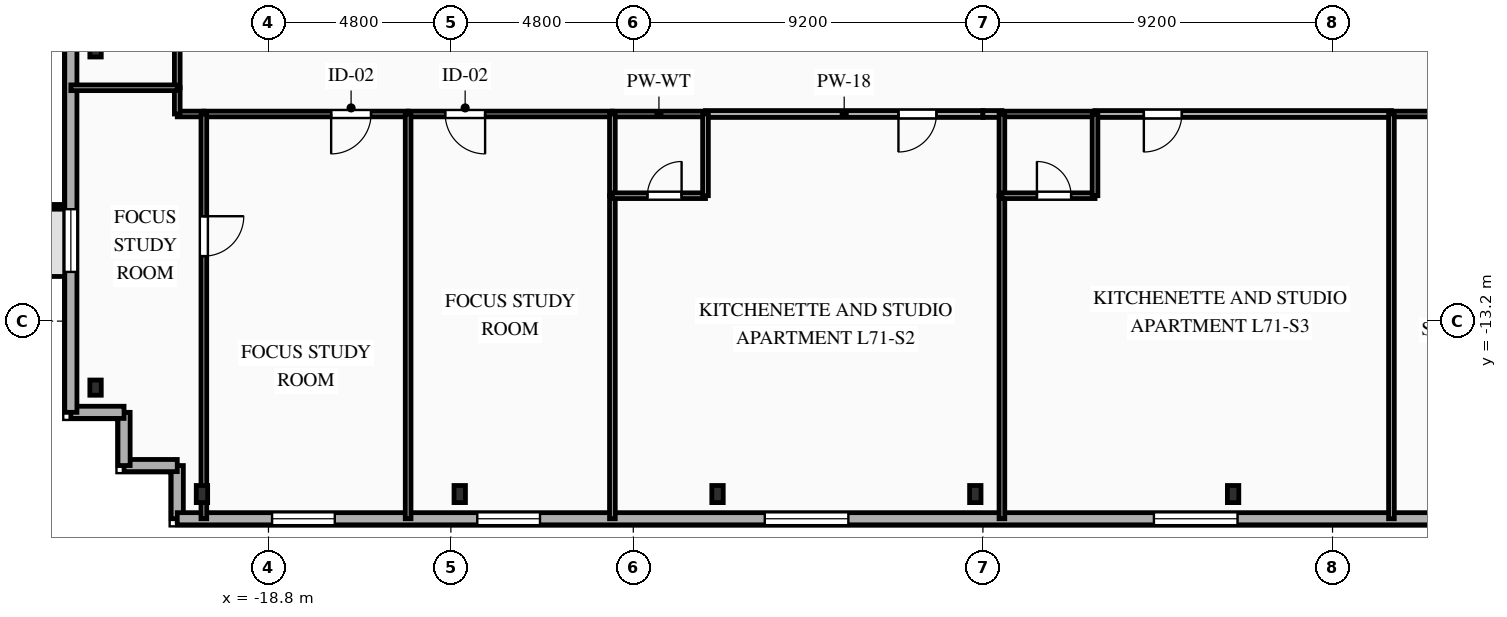
"""IFC4 building model, lengths in metres.
Left out: names, types, materials, properties, quantities, classifications, styles, units other than length and angle.
Written with IfcOpenShell. Run it as: python <this file> out.ifc"""

import sys

from ifc_helpers import new_model, si_unit, direction, frame, frame_2d, origin, origin_2d, place, context, subcontext, project, spatial, rectangle, i_section, extrude, element, fill, save


model = new_model("IFC4")
c1 = context("Model", 3, precision=1e-05, world=origin(), true_north=direction((0.0, 1.0)))
c2 = subcontext(c1, "Body", "Model", "MODEL_VIEW")
j1 = project(units=[si_unit("LENGTHUNIT", "METRE"), si_unit("PLANEANGLEUNIT", "RADIAN")], contexts=[c1])
p1 = place(None, origin())
s1 = spatial("IfcSite", under=j1, at=p1, CompositionType="ELEMENT")
p2 = place(p1, origin())
s2 = spatial("IfcBuilding", under=s1, at=p2, CompositionType="ELEMENT")
p3 = place(p2, frame((0.0, 0.0, 251.75)))
s3 = spatial("IfcBuildingStorey", under=s2, at=p3, CompositionType="ELEMENT", Elevation=251.75)
for number, where, z_axis, x_axis in (
    (1, (-20.55, -17.75, 0.0), (0.0, 0.0, 1.0), (1.0, 0.0, 0.0)),
    (2, (-13.767, -17.75, 0.0), (0.0, 0.0, 1.0), (1.0, 0.0, 0.0)),
    (3, (-6.983, -17.75, 0.0), (0.0, 0.0, 1.0), (1.0, 0.0, 0.0)),
    (4, (-0.2, -17.75, 0.0), (0.0, 0.0, 1.0), (1.0, 0.0, 0.0)),
    (5, (6.583, -17.75, 0.0), (0.0, 0.0, 1.0), (1.0, 0.0, 0.0)),
):
    element("IfcColumn", number, at=place(p3, frame(where, z_axis=z_axis, x_axis=x_axis)), inside=s3, PredefinedType="COLUMN", context=c2, shape_type="SweptSolid", body=[
        extrude(i_section(OverallWidth=0.3, OverallDepth=0.45, WebThickness=0.014, FlangeThickness=0.026, FilletRadius=0.027, at=origin_2d()), origin(), (0.0, 0.0, 1.0), 3.35),
    ])
for number, where, z_axis, x_axis in (
    (6, (-23.35, -6.05, 0.0), (0.0, 0.0, 1.0), (1.0, 0.0, 0.0)),
    (7, (-23.35, -14.95, 0.0), (0.0, 0.0, 1.0), (1.0, 0.0, 0.0)),
):
    element("IfcColumn", number, at=place(p3, frame(where, z_axis=z_axis, x_axis=x_axis)), inside=s3, PredefinedType="COLUMN", context=c2, shape_type="SweptSolid", body=[
        extrude(i_section(OverallWidth=0.3, OverallDepth=0.4, WebThickness=0.013, FlangeThickness=0.024, FilletRadius=0.027, at=origin_2d()), origin(), (0.0, 0.0, 1.0), 3.35),
    ])
p4 = place(p3, frame((-21.2, -18.4, 0.0), z_axis=(0.0, 0.0, 1.0), x_axis=(0.0, 1.0, 0.0)))
e8 = element("IfcWall", 8, at=p4, inside=s3, PredefinedType="SOLIDWALL", context=c2, shape_type="SweptSolid", body=[
    extrude(rectangle(XDim=1.4, YDim=0.32, at=frame_2d((0.7, 0.0))), origin(), (0.0, 0.0, 1.0), 3.04),
])
p5 = place(p3, frame((-21.2, -17.0, 0.0), z_axis=(0.0, 0.0, 1.0), x_axis=(-1.0, 0.0, 0.0)))
e9 = element("IfcWall", 9, at=p5, inside=s3, PredefinedType="SOLIDWALL", context=c2, shape_type="SweptSolid", body=[
    extrude(rectangle(XDim=1.4, YDim=0.32, at=frame_2d((0.7, 0.0))), origin(), (0.0, 0.0, 1.0), 3.04),
])
for number, where, z_axis, x_axis in (
    (10, (-22.6, -17.0, 0.0), (0.0, 0.0, 1.0), (0.0, 1.0, 0.0)),
    (11, (-22.6, -15.6, 0.0), (0.0, 0.0, 1.0), (-1.0, 0.0, 0.0)),
):
    element("IfcWall", number, at=place(p3, frame(where, z_axis=z_axis, x_axis=x_axis)), inside=s3, PredefinedType="SOLIDWALL", context=c2, shape_type="SweptSolid", body=[
        extrude(rectangle(XDim=1.4, YDim=0.32, at=frame_2d((0.7, 0.0))), origin(), (0.0, 0.0, 1.0), 3.04),
    ])
p6 = place(p3, frame((-24.0, -15.6, 0.0), z_axis=(0.0, 0.0, 1.0), x_axis=(0.0, 1.0, 0.0)))
e12 = element("IfcWall", 12, at=p6, inside=s3, PredefinedType="SOLIDWALL", context=c2, shape_type="SweptSolid", body=[
    extrude(rectangle(XDim=28.0, YDim=0.32, at=frame_2d((14.0, 0.0))), origin(), (0.0, 0.0, 1.0), 3.04),
])
p7 = place(p6, frame((3.695, 0.0, 0.85)))
e13 = element("IfcOpeningElement", 13, at=p7, cuts=e12, PredefinedType="OPENING", context=c2, shape_type="SweptSolid", body=[
    extrude(rectangle(XDim=1.65, YDim=1.85, at=frame_2d((0.825, 0.925))), frame((0.0, 0.17, 0.0), z_axis=(0.0, -1.0, 0.0), x_axis=(1.0, 0.0, 0.0)), (0.0, 0.0, 1.0), 0.34),
])
p8 = place(p6, frame((13.215, 0.0, 0.85)))
e14 = element("IfcOpeningElement", 14, at=p8, cuts=e12, PredefinedType="OPENING", context=c2, shape_type="SweptSolid", body=[
    extrude(rectangle(XDim=1.65, YDim=1.85, at=frame_2d((0.825, 0.925))), frame((0.0, 0.17, 0.0), z_axis=(0.0, -1.0, 0.0), x_axis=(1.0, 0.0, 0.0)), (0.0, 0.0, 1.0), 0.34),
])
p9 = place(p6, frame((22.735, 0.0, 0.85)))
e15 = element("IfcOpeningElement", 15, at=p9, cuts=e12, PredefinedType="OPENING", context=c2, shape_type="SweptSolid", body=[
    extrude(rectangle(XDim=1.65, YDim=1.85, at=frame_2d((0.825, 0.925))), frame((0.0, 0.17, 0.0), z_axis=(0.0, -1.0, 0.0), x_axis=(1.0, 0.0, 0.0)), (0.0, 0.0, 1.0), 0.34),
])
p10 = place(p3, frame((20.8, -18.4, 0.0), z_axis=(0.0, 0.0, 1.0), x_axis=(-1.0, 0.0, 0.0)))
e16 = element("IfcWall", 16, at=p10, inside=s3, PredefinedType="SOLIDWALL", context=c2, shape_type="SweptSolid", body=[
    extrude(rectangle(XDim=42.0, YDim=0.32, at=frame_2d((21.0, 0.0))), origin(), (0.0, 0.0, 1.0), 3.04),
])
p11 = place(p10, frame((2.015, 0.0, 0.85)))
e17 = element("IfcOpeningElement", 17, at=p11, cuts=e16, PredefinedType="OPENING", context=c2, shape_type="SweptSolid", body=[
    extrude(rectangle(XDim=1.65, YDim=1.85, at=frame_2d((0.825, 0.925))), frame((0.0, 0.17, 0.0), z_axis=(0.0, -1.0, 0.0), x_axis=(1.0, 0.0, 0.0)), (0.0, 0.0, 1.0), 0.34),
])
p12 = place(p10, frame((6.815, 0.0, 0.85)))
e18 = element("IfcOpeningElement", 18, at=p12, cuts=e16, PredefinedType="OPENING", context=c2, shape_type="SweptSolid", body=[
    extrude(rectangle(XDim=1.65, YDim=1.85, at=frame_2d((0.825, 0.925))), frame((0.0, 0.17, 0.0), z_axis=(0.0, -1.0, 0.0), x_axis=(1.0, 0.0, 0.0)), (0.0, 0.0, 1.0), 0.34),
])
p13 = place(p10, frame((14.1, 0.0, 0.85)))
e19 = element("IfcOpeningElement", 19, at=p13, cuts=e16, PredefinedType="OPENING", context=c2, shape_type="SweptSolid", body=[
    extrude(rectangle(XDim=2.2, YDim=1.85, at=frame_2d((1.1, 0.925))), frame((0.0, 0.17, 0.0), z_axis=(0.0, -1.0, 0.0), x_axis=(1.0, 0.0, 0.0)), (0.0, 0.0, 1.0), 0.34),
])
p14 = place(p10, frame((24.34, 0.0, 0.85)))
e20 = element("IfcOpeningElement", 20, at=p14, cuts=e16, PredefinedType="OPENING", context=c2, shape_type="SweptSolid", body=[
    extrude(rectangle(XDim=2.2, YDim=1.85, at=frame_2d((1.1, 0.925))), frame((0.0, 0.17, 0.0), z_axis=(0.0, -1.0, 0.0), x_axis=(1.0, 0.0, 0.0)), (0.0, 0.0, 1.0), 0.34),
])
p15 = place(p10, frame((32.455, 0.0, 0.85)))
e21 = element("IfcOpeningElement", 21, at=p15, cuts=e16, PredefinedType="OPENING", context=c2, shape_type="SweptSolid", body=[
    extrude(rectangle(XDim=1.65, YDim=1.85, at=frame_2d((0.825, 0.925))), frame((0.0, 0.17, 0.0), z_axis=(0.0, -1.0, 0.0), x_axis=(1.0, 0.0, 0.0)), (0.0, 0.0, 1.0), 0.34),
])
p16 = place(p10, frame((37.855, 0.0, 0.85)))
e22 = element("IfcOpeningElement", 22, at=p16, cuts=e16, PredefinedType="OPENING", context=c2, shape_type="SweptSolid", body=[
    extrude(rectangle(XDim=1.65, YDim=1.85, at=frame_2d((0.825, 0.925))), frame((0.0, 0.17, 0.0), z_axis=(0.0, -1.0, 0.0), x_axis=(1.0, 0.0, 0.0)), (0.0, 0.0, 1.0), 0.34),
])
p17 = place(p3, frame((-20.5, -7.75, 0.0), z_axis=(0.0, 0.0, 1.0), x_axis=(-1.0, 0.0, 0.0)))
e23 = element("IfcWall", 23, at=p17, inside=s3, PredefinedType="PARTITIONING", context=c2, shape_type="SweptSolid", body=[
    extrude(rectangle(XDim=0.7, YDim=0.15, at=frame_2d((0.35, 0.0))), origin(), (0.0, 0.0, 1.0), 3.04),
])
p18 = place(p3, frame((-21.2, -7.75, 0.0), z_axis=(0.0, 0.0, 1.0), x_axis=(0.0, 1.0, 0.0)))
e24 = element("IfcWall", 24, at=p18, inside=s3, PredefinedType="PARTITIONING", context=c2, shape_type="SweptSolid", body=[
    extrude(rectangle(XDim=0.69, YDim=0.15, at=frame_2d((0.345, 0.0))), origin(), (0.0, 0.0, 1.0), 2.695),
])
p19 = place(p3, frame((-21.2, -7.06, 0.0), z_axis=(0.0, 0.0, 1.0), x_axis=(0.0, 1.0, 0.0)))
e25 = element("IfcWall", 25, at=p19, inside=s3, PredefinedType="PARTITIONING", context=c2, shape_type="SweptSolid", body=[
    extrude(rectangle(XDim=1.46, YDim=0.15, at=frame_2d((0.73, 0.0))), origin(), (0.0, 0.0, 1.0), 2.695),
])
p20 = place(p3, frame((-15.125, -7.75, 0.0), z_axis=(0.0, 0.0, 1.0), x_axis=(-1.0, 0.0, 0.0)))
e26 = element("IfcWall", 26, at=p20, inside=s3, PredefinedType="PARTITIONING", context=c2, shape_type="SweptSolid", body=[
    extrude(rectangle(XDim=5.375, YDim=0.15, at=frame_2d((2.688, 0.0))), origin(), (0.0, 0.0, 1.0), 3.04),
])
p21 = place(p20, frame((0.976, 0.0, 0.0)))
e27 = element("IfcOpeningElement", 27, at=p21, cuts=e26, PredefinedType="OPENING", context=c2, shape_type="SweptSolid", body=[
    extrude(rectangle(XDim=1.05, YDim=2.15, at=frame_2d((0.525, 1.075))), frame((0.0, 0.085, 0.0), z_axis=(0.0, -1.0, 0.0), x_axis=(1.0, 0.0, 0.0)), (0.0, 0.0, 1.0), 0.17),
])
p22 = place(p3, frame((-9.75, -7.75, 0.0), z_axis=(0.0, 0.0, 1.0), x_axis=(-1.0, 0.0, 0.0)))
e28 = element("IfcWall", 28, at=p22, inside=s3, PredefinedType="PARTITIONING", context=c2, shape_type="SweptSolid", body=[
    extrude(rectangle(XDim=5.375, YDim=0.15, at=frame_2d((2.688, 0.0))), origin(), (0.0, 0.0, 1.0), 3.04),
])
p23 = place(p22, frame((3.349, 0.0, 0.0)))
e29 = element("IfcOpeningElement", 29, at=p23, cuts=e28, PredefinedType="OPENING", context=c2, shape_type="SweptSolid", body=[
    extrude(rectangle(XDim=1.05, YDim=2.15, at=frame_2d((0.525, 1.075))), frame((0.0, 0.085, 0.0), z_axis=(0.0, -1.0, 0.0), x_axis=(1.0, 0.0, 0.0)), (0.0, 0.0, 1.0), 0.17),
])
p24 = place(p3, frame((0.0, -7.75, 0.0), z_axis=(0.0, 0.0, 1.0), x_axis=(-1.0, 0.0, 0.0)))
e30 = element("IfcWall", 30, at=p24, inside=s3, PredefinedType="PARTITIONING", context=c2, shape_type="SweptSolid", body=[
    extrude(rectangle(XDim=7.3, YDim=0.18, at=frame_2d((3.65, 0.0))), origin(), (0.0, 0.0, 1.0), 3.04),
])
p25 = place(p24, frame((1.222, 0.0, 0.0)))
e31 = element("IfcOpeningElement", 31, at=p25, cuts=e30, PredefinedType="OPENING", context=c2, shape_type="SweptSolid", body=[
    extrude(rectangle(XDim=1.0, YDim=2.15, at=frame_2d((0.5, 1.075))), frame((0.0, 0.1, 0.0), z_axis=(0.0, -1.0, 0.0), x_axis=(1.0, 0.0, 0.0)), (0.0, 0.0, 1.0), 0.2),
])
p26 = place(p3, frame((-7.3, -7.75, 0.0), z_axis=(0.0, 0.0, 1.0), x_axis=(-1.0, 0.0, 0.0)))
e32 = element("IfcWall", 32, at=p26, inside=s3, PredefinedType="PLUMBINGWALL", context=c2, shape_type="SweptSolid", body=[
    extrude(rectangle(XDim=2.45, YDim=0.15, at=frame_2d((1.225, 0.0))), origin(), (0.0, 0.0, 1.0), 3.04),
])
p27 = place(p3, frame((0.5, -7.75, 0.0), z_axis=(0.0, 0.0, 1.0), x_axis=(-1.0, 0.0, 0.0)))
e33 = element("IfcWall", 33, at=p27, inside=s3, PredefinedType="PARTITIONING", context=c2, shape_type="SweptSolid", body=[
    extrude(rectangle(XDim=0.5, YDim=0.18, at=frame_2d((0.25, 0.0))), origin(), (0.0, 0.0, 1.0), 3.04),
])
p28 = place(p3, frame((10.75, -7.75, 0.0), z_axis=(0.0, 0.0, 1.0), x_axis=(-1.0, 0.0, 0.0)))
e34 = element("IfcWall", 34, at=p28, inside=s3, PredefinedType="PARTITIONING", context=c2, shape_type="SweptSolid", body=[
    extrude(rectangle(XDim=7.8, YDim=0.18, at=frame_2d((3.9, 0.0))), origin(), (0.0, 0.0, 1.0), 3.04),
])
p29 = place(p28, frame((5.515, 0.0, 0.0)))
e35 = element("IfcOpeningElement", 35, at=p29, cuts=e34, PredefinedType="OPENING", context=c2, shape_type="SweptSolid", body=[
    extrude(rectangle(XDim=1.0, YDim=2.15, at=frame_2d((0.5, 1.075))), frame((0.0, 0.1, 0.0), z_axis=(0.0, -1.0, 0.0), x_axis=(1.0, 0.0, 0.0)), (0.0, 0.0, 1.0), 0.2),
])
p30 = place(p3, frame((2.95, -7.75, 0.0), z_axis=(0.0, 0.0, 1.0), x_axis=(-1.0, 0.0, 0.0)))
e36 = element("IfcWall", 36, at=p30, inside=s3, PredefinedType="PLUMBINGWALL", context=c2, shape_type="SweptSolid", body=[
    extrude(rectangle(XDim=2.45, YDim=0.15, at=frame_2d((1.225, 0.0))), origin(), (0.0, 0.0, 1.0), 3.04),
])
p31 = place(p3, frame((15.625, -7.75, 0.0), z_axis=(0.0, 0.0, 1.0), x_axis=(-1.0, 0.0, 0.0)))
e37 = element("IfcWall", 37, at=p31, inside=s3, PredefinedType="PARTITIONING", context=c2, shape_type="SweptSolid", body=[
    extrude(rectangle(XDim=4.875, YDim=0.15, at=frame_2d((2.438, 0.0))), origin(), (0.0, 0.0, 1.0), 3.04),
])
p32 = place(p31, frame((1.246, 0.0, 0.0)))
e38 = element("IfcOpeningElement", 38, at=p32, cuts=e37, PredefinedType="OPENING", context=c2, shape_type="SweptSolid", body=[
    extrude(rectangle(XDim=1.05, YDim=2.15, at=frame_2d((0.525, 1.075))), frame((0.0, 0.085, 0.0), z_axis=(0.0, -1.0, 0.0), x_axis=(1.0, 0.0, 0.0)), (0.0, 0.0, 1.0), 0.17),
])
p33 = place(p3, frame((-24.0, -7.06, 0.0), z_axis=(0.0, 0.0, 1.0), x_axis=(1.0, 0.0, 0.0)))
e39 = element("IfcWall", 39, at=p33, inside=s3, PredefinedType="PARTITIONING", context=c2, shape_type="SweptSolid", body=[
    extrude(rectangle(XDim=2.8, YDim=0.15, at=frame_2d((1.4, 0.0))), origin(), (0.0, 0.0, 1.0), 3.04),
])
p34 = place(p3, frame((-20.5, -7.75, 0.0), z_axis=(0.0, 0.0, 1.0), x_axis=(0.0, -1.0, 0.0)))
e40 = element("IfcWall", 40, at=p34, inside=s3, PredefinedType="PARTITIONING", context=c2, shape_type="SweptSolid", body=[
    extrude(rectangle(XDim=10.65, YDim=0.15, at=frame_2d((5.325, 0.0))), origin(), (0.0, 0.0, 1.0), 2.665),
])
p35 = place(p34, frame((2.69, 0.0, 0.0)))
e41 = element("IfcOpeningElement", 41, at=p35, cuts=e40, PredefinedType="OPENING", context=c2, shape_type="SweptSolid", body=[
    extrude(rectangle(XDim=1.05, YDim=2.15, at=frame_2d((0.525, 1.075))), frame((0.0, 0.085, 0.0), z_axis=(0.0, -1.0, 0.0), x_axis=(1.0, 0.0, 0.0)), (0.0, 0.0, 1.0), 0.17),
])
p36 = place(p3, frame((-15.125, -7.75, 0.0), z_axis=(0.0, 0.0, 1.0), x_axis=(0.0, -1.0, 0.0)))
e42 = element("IfcWall", 42, at=p36, inside=s3, PredefinedType="PARTITIONING", context=c2, shape_type="SweptSolid", body=[
    extrude(rectangle(XDim=10.65, YDim=0.15, at=frame_2d((5.325, 0.0))), origin(), (0.0, 0.0, 1.0), 3.04),
])
p37 = place(p3, frame((-9.75, -9.9, 0.0), z_axis=(0.0, 0.0, 1.0), x_axis=(0.0, -1.0, 0.0)))
e43 = element("IfcWall", 43, at=p37, inside=s3, PredefinedType="PARTITIONING", context=c2, shape_type="SweptSolid", body=[
    extrude(rectangle(XDim=8.5, YDim=0.15, at=frame_2d((4.25, 0.0))), origin(), (0.0, 0.0, 1.0), 3.04),
])
p38 = place(p3, frame((-9.75, -7.75, 0.0), z_axis=(0.0, 0.0, 1.0), x_axis=(0.0, -1.0, 0.0)))
e44 = element("IfcWall", 44, at=p38, inside=s3, PredefinedType="PLUMBINGWALL", context=c2, shape_type="SweptSolid", body=[
    extrude(rectangle(XDim=2.15, YDim=0.15, at=frame_2d((1.075, 0.0))), origin(), (0.0, 0.0, 1.0), 3.04),
])
p39 = place(p3, frame((-9.75, -9.9, 0.0), z_axis=(0.0, 0.0, 1.0), x_axis=(1.0, 0.0, 0.0)))
e45 = element("IfcWall", 45, at=p39, inside=s3, PredefinedType="PLUMBINGWALL", context=c2, shape_type="SweptSolid", body=[
    extrude(rectangle(XDim=2.45, YDim=0.15, at=frame_2d((1.225, 0.0))), origin(), (0.0, 0.0, 1.0), 3.04),
])
p40 = place(p39, frame((0.921, 0.0, 0.0)))
e46 = element("IfcOpeningElement", 46, at=p40, cuts=e45, PredefinedType="OPENING", context=c2, shape_type="SweptSolid", body=[
    extrude(rectangle(XDim=0.9, YDim=2.1, at=frame_2d((0.45, 1.05))), frame((0.0, 0.085, 0.0), z_axis=(0.0, -1.0, 0.0), x_axis=(1.0, 0.0, 0.0)), (0.0, 0.0, 1.0), 0.17),
])
p41 = place(p3, frame((-7.3, -9.9, 0.0), z_axis=(0.0, 0.0, 1.0), x_axis=(0.0, 1.0, 0.0)))
e47 = element("IfcWall", 47, at=p41, inside=s3, PredefinedType="PLUMBINGWALL", context=c2, shape_type="SweptSolid", body=[
    extrude(rectangle(XDim=2.15, YDim=0.15, at=frame_2d((1.075, 0.0))), origin(), (0.0, 0.0, 1.0), 3.04),
])
p42 = place(p3, frame((0.5, -9.9, 0.0), z_axis=(0.0, 0.0, 1.0), x_axis=(0.0, -1.0, 0.0)))
e48 = element("IfcWall", 48, at=p42, inside=s3, PredefinedType="PARTITIONING", context=c2, shape_type="SweptSolid", body=[
    extrude(rectangle(XDim=8.5, YDim=0.15, at=frame_2d((4.25, 0.0))), origin(), (0.0, 0.0, 1.0), 3.04),
])
p43 = place(p3, frame((0.5, -7.75, 0.0), z_axis=(0.0, 0.0, 1.0), x_axis=(0.0, -1.0, 0.0)))
e49 = element("IfcWall", 49, at=p43, inside=s3, PredefinedType="PLUMBINGWALL", context=c2, shape_type="SweptSolid", body=[
    extrude(rectangle(XDim=2.15, YDim=0.15, at=frame_2d((1.075, 0.0))), origin(), (0.0, 0.0, 1.0), 3.04),
])
p44 = place(p3, frame((0.5, -9.9, 0.0), z_axis=(0.0, 0.0, 1.0), x_axis=(1.0, 0.0, 0.0)))
e50 = element("IfcWall", 50, at=p44, inside=s3, PredefinedType="PLUMBINGWALL", context=c2, shape_type="SweptSolid", body=[
    extrude(rectangle(XDim=2.45, YDim=0.15, at=frame_2d((1.225, 0.0))), origin(), (0.0, 0.0, 1.0), 3.04),
])
p45 = place(p44, frame((0.921, 0.0, 0.0)))
e51 = element("IfcOpeningElement", 51, at=p45, cuts=e50, PredefinedType="OPENING", context=c2, shape_type="SweptSolid", body=[
    extrude(rectangle(XDim=0.9, YDim=2.1, at=frame_2d((0.45, 1.05))), frame((0.0, 0.085, 0.0), z_axis=(0.0, -1.0, 0.0), x_axis=(1.0, 0.0, 0.0)), (0.0, 0.0, 1.0), 0.17),
])
p46 = place(p3, frame((2.95, -9.9, 0.0), z_axis=(0.0, 0.0, 1.0), x_axis=(0.0, 1.0, 0.0)))
e52 = element("IfcWall", 52, at=p46, inside=s3, PredefinedType="PLUMBINGWALL", context=c2, shape_type="SweptSolid", body=[
    extrude(rectangle(XDim=2.15, YDim=0.15, at=frame_2d((1.075, 0.0))), origin(), (0.0, 0.0, 1.0), 3.04),
])
p47 = place(p3, frame((10.75, -7.75, 0.0), z_axis=(0.0, 0.0, 1.0), x_axis=(0.0, -1.0, 0.0)))
e53 = element("IfcWall", 53, at=p47, inside=s3, PredefinedType="PARTITIONING", context=c2, shape_type="SweptSolid", body=[
    extrude(rectangle(XDim=10.65, YDim=0.15, at=frame_2d((5.325, 0.0))), origin(), (0.0, 0.0, 1.0), 3.04),
])
p48 = place(p7, origin())
e54 = element("IfcWindow", 54, at=p48, inside=s3, PartitioningType="SINGLE_PANEL", PredefinedType="WINDOW", context=c2, shape_type="SweptSolid", body=[
    extrude(rectangle(XDim=1.65, YDim=1.85, at=frame_2d((0.825, 0.925))), frame((0.0, 0.03, 0.0), z_axis=(0.0, -1.0, 0.0), x_axis=(1.0, 0.0, 0.0)), (0.0, 0.0, 1.0), 0.06),
])
fill(e13, e54)
p49 = place(p13, origin())
e55 = element("IfcWindow", 55, at=p49, inside=s3, PartitioningType="SINGLE_PANEL", PredefinedType="WINDOW", context=c2, shape_type="SweptSolid", body=[
    extrude(rectangle(XDim=2.2, YDim=1.85, at=frame_2d((1.1, 0.925))), frame((0.0, 0.03, 0.0), z_axis=(0.0, -1.0, 0.0), x_axis=(1.0, 0.0, 0.0)), (0.0, 0.0, 1.0), 0.06),
])
fill(e19, e55)
p50 = place(p14, origin())
e56 = element("IfcWindow", 56, at=p50, inside=s3, PartitioningType="SINGLE_PANEL", PredefinedType="WINDOW", context=c2, shape_type="SweptSolid", body=[
    extrude(rectangle(XDim=2.2, YDim=1.85, at=frame_2d((1.1, 0.925))), frame((0.0, 0.03, 0.0), z_axis=(0.0, -1.0, 0.0), x_axis=(1.0, 0.0, 0.0)), (0.0, 0.0, 1.0), 0.06),
])
fill(e20, e56)
p51 = place(p15, origin())
e57 = element("IfcWindow", 57, at=p51, inside=s3, PartitioningType="SINGLE_PANEL", PredefinedType="WINDOW", context=c2, shape_type="SweptSolid", body=[
    extrude(rectangle(XDim=1.65, YDim=1.85, at=frame_2d((0.825, 0.925))), frame((0.0, 0.03, 0.0), z_axis=(0.0, -1.0, 0.0), x_axis=(1.0, 0.0, 0.0)), (0.0, 0.0, 1.0), 0.06),
])
fill(e21, e57)
p52 = place(p16, origin())
e58 = element("IfcWindow", 58, at=p52, inside=s3, PartitioningType="SINGLE_PANEL", PredefinedType="WINDOW", context=c2, shape_type="SweptSolid", body=[
    extrude(rectangle(XDim=1.65, YDim=1.85, at=frame_2d((0.825, 0.925))), frame((0.0, 0.03, 0.0), z_axis=(0.0, -1.0, 0.0), x_axis=(1.0, 0.0, 0.0)), (0.0, 0.0, 1.0), 0.06),
])
fill(e22, e58)
p53 = place(p21, origin())
e59 = element("IfcDoor", 59, at=p53, inside=s3, OperationType="SINGLE_SWING_RIGHT", PredefinedType="DOOR", context=c2, shape_type="SweptSolid", body=[
    extrude(rectangle(XDim=1.05, YDim=2.15, at=frame_2d((0.525, 1.075))), frame((0.0, 0.025, 0.0), z_axis=(0.0, -1.0, 0.0), x_axis=(1.0, 0.0, 0.0)), (0.0, 0.0, 1.0), 0.05),
])
fill(e27, e59)
p54 = place(p23, origin())
e60 = element("IfcDoor", 60, at=p54, inside=s3, OperationType="SINGLE_SWING_LEFT", PredefinedType="DOOR", context=c2, shape_type="SweptSolid", body=[
    extrude(rectangle(XDim=1.05, YDim=2.15, at=frame_2d((0.525, 1.075))), frame((0.0, 0.025, 0.0), z_axis=(0.0, -1.0, 0.0), x_axis=(1.0, 0.0, 0.0)), (0.0, 0.0, 1.0), 0.05),
])
fill(e29, e60)
p55 = place(p25, origin())
e61 = element("IfcDoor", 61, at=p55, inside=s3, OperationType="SINGLE_SWING_RIGHT", PredefinedType="DOOR", context=c2, shape_type="SweptSolid", body=[
    extrude(rectangle(XDim=1.0, YDim=2.15, at=frame_2d((0.5, 1.075))), frame((0.0, 0.025, 0.0), z_axis=(0.0, -1.0, 0.0), x_axis=(1.0, 0.0, 0.0)), (0.0, 0.0, 1.0), 0.05),
])
fill(e31, e61)
p56 = place(p29, origin())
e62 = element("IfcDoor", 62, at=p56, inside=s3, OperationType="SINGLE_SWING_RIGHT", PredefinedType="DOOR", context=c2, shape_type="SweptSolid", body=[
    extrude(rectangle(XDim=1.0, YDim=2.15, at=frame_2d((0.5, 1.075))), frame((0.0, 0.025, 0.0), z_axis=(0.0, -1.0, 0.0), x_axis=(1.0, 0.0, 0.0)), (0.0, 0.0, 1.0), 0.05),
])
fill(e35, e62)
p57 = place(p35, origin())
e63 = element("IfcDoor", 63, at=p57, inside=s3, OperationType="SINGLE_SWING_LEFT", PredefinedType="DOOR", context=c2, shape_type="SweptSolid", body=[
    extrude(rectangle(XDim=1.05, YDim=2.15, at=frame_2d((0.525, 1.075))), frame((0.0, 0.025, 0.0), z_axis=(0.0, -1.0, 0.0), x_axis=(1.0, 0.0, 0.0)), (0.0, 0.0, 1.0), 0.05),
])
fill(e41, e63)
p58 = place(p40, origin())
e64 = element("IfcDoor", 64, at=p58, inside=s3, OperationType="SINGLE_SWING_RIGHT", PredefinedType="DOOR", context=c2, shape_type="SweptSolid", body=[
    extrude(rectangle(XDim=0.9, YDim=2.1, at=frame_2d((0.45, 1.05))), frame((0.0, 0.025, 0.0), z_axis=(0.0, -1.0, 0.0), x_axis=(1.0, 0.0, 0.0)), (0.0, 0.0, 1.0), 0.05),
])
fill(e46, e64)
p59 = place(p45, origin())
e65 = element("IfcDoor", 65, at=p59, inside=s3, OperationType="SINGLE_SWING_LEFT", PredefinedType="DOOR", context=c2, shape_type="SweptSolid", body=[
    extrude(rectangle(XDim=0.9, YDim=2.1, at=frame_2d((0.45, 1.05))), frame((0.0, 0.025, 0.0), z_axis=(0.0, -1.0, 0.0), x_axis=(1.0, 0.0, 0.0)), (0.0, 0.0, 1.0), 0.05),
])
fill(e51, e65)
save(model, sys.argv[1])
